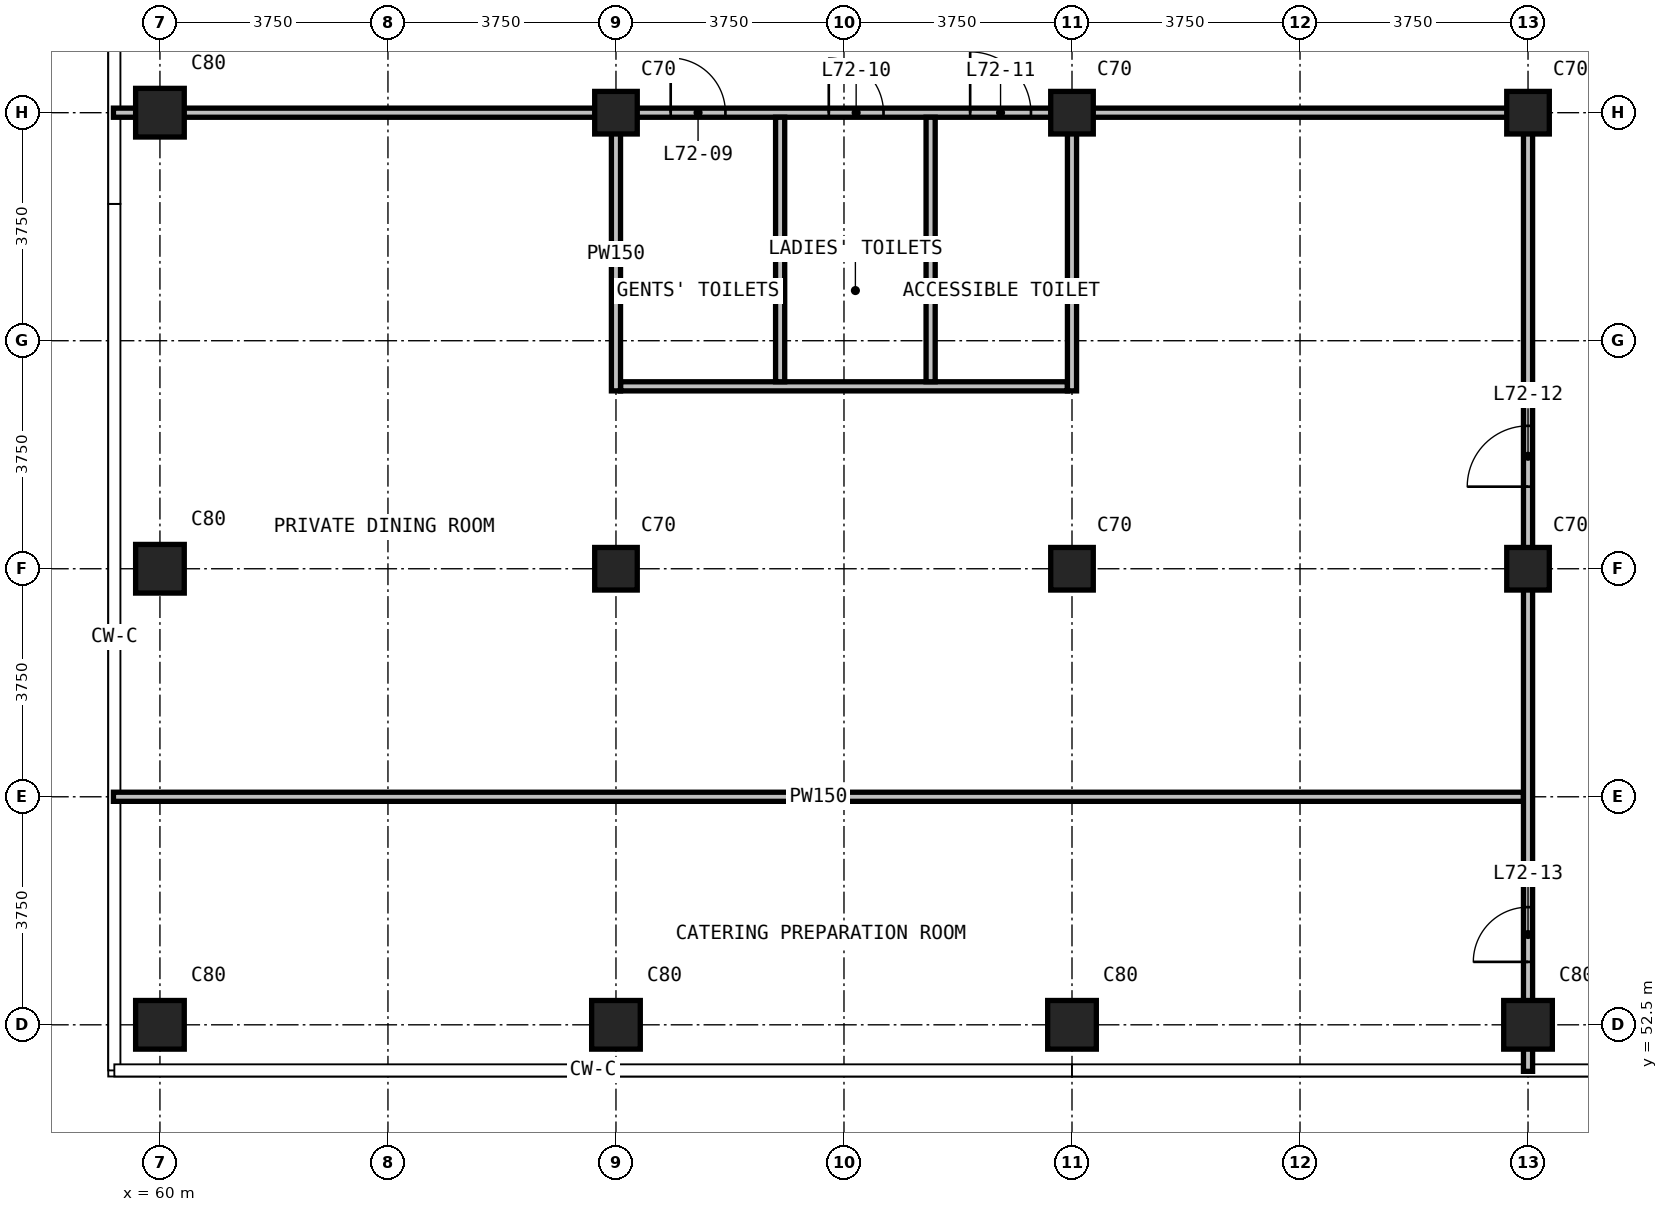
"""IFC4 building model, lengths in metres.
Left out: names, types, materials, properties, quantities, classifications, styles, units other than length and angle.
Written with IfcOpenShell. Run it as: python <this file> out.ifc"""

import sys

from ifc_helpers import new_model, si_unit, direction, frame, frame_2d, origin, origin_2d, place, context, subcontext, project, spatial, rectangle, extrude, element, fill, save


model = new_model("IFC4")
c1 = context("Model", 3, precision=1e-05, world=origin(), true_north=direction((0.0, 1.0)))
c2 = subcontext(c1, "Body", "Model", "MODEL_VIEW")
j1 = project(units=[si_unit("LENGTHUNIT", "METRE"), si_unit("PLANEANGLEUNIT", "RADIAN")], contexts=[c1])
p1 = place(None, origin())
s1 = spatial("IfcSite", under=j1, at=p1, CompositionType="ELEMENT")
p2 = place(p1, origin())
s2 = spatial("IfcBuilding", under=s1, at=p2, CompositionType="ELEMENT")
p3 = place(p2, frame((0.0, 0.0, 276.5)))
s3 = spatial("IfcBuildingStorey", under=s2, at=p3, CompositionType="ELEMENT", Elevation=276.5)
for number, where, z_axis, x_axis in (
    (1, (60.0, 52.5, 0.0), (0.0, 0.0, 1.0), (1.0, 0.0, 0.0)),
    (2, (60.0, 60.0, 0.0), (0.0, 0.0, 1.0), (1.0, 0.0, 0.0)),
    (3, (60.0, 67.5, 0.0), (0.0, 0.0, 1.0), (1.0, 0.0, 0.0)),
    (4, (67.5, 52.5, 0.0), (0.0, 0.0, 1.0), (1.0, 0.0, 0.0)),
):
    element("IfcColumn", number, at=place(p3, frame(where, z_axis=z_axis, x_axis=x_axis)), inside=s3, PredefinedType="COLUMN", context=c2, shape_type="SweptSolid", body=[
        extrude(rectangle(XDim=0.8, YDim=0.8, at=origin_2d()), origin(), (0.0, 0.0, 1.0), 3.6),
    ])
for number, where, z_axis, x_axis in (
    (5, (67.5, 60.0, 0.0), (0.0, 0.0, 1.0), (1.0, 0.0, 0.0)),
    (6, (67.5, 67.5, 0.0), (0.0, 0.0, 1.0), (1.0, 0.0, 0.0)),
):
    element("IfcColumn", number, at=place(p3, frame(where, z_axis=z_axis, x_axis=x_axis)), inside=s3, PredefinedType="COLUMN", context=c2, shape_type="SweptSolid", body=[
        extrude(rectangle(XDim=0.7, YDim=0.7, at=origin_2d()), origin(), (0.0, 0.0, 1.0), 3.6),
    ])
p4 = place(p3, frame((75.0, 52.5, 0.0), z_axis=(0.0, 0.0, 1.0), x_axis=(1.0, 0.0, 0.0)))
e7 = element("IfcColumn", 7, at=p4, inside=s3, PredefinedType="COLUMN", context=c2, shape_type="SweptSolid", body=[
    extrude(rectangle(XDim=0.8, YDim=0.8, at=origin_2d()), origin(), (0.0, 0.0, 1.0), 3.6),
])
for number, where, z_axis, x_axis in (
    (8, (75.0, 60.0, 0.0), (0.0, 0.0, 1.0), (1.0, 0.0, 0.0)),
    (9, (75.0, 67.5, 0.0), (0.0, 0.0, 1.0), (1.0, 0.0, 0.0)),
):
    element("IfcColumn", number, at=place(p3, frame(where, z_axis=z_axis, x_axis=x_axis)), inside=s3, PredefinedType="COLUMN", context=c2, shape_type="SweptSolid", body=[
        extrude(rectangle(XDim=0.7, YDim=0.7, at=origin_2d()), origin(), (0.0, 0.0, 1.0), 3.6),
    ])
p5 = place(p3, frame((82.5, 52.5, 0.0), z_axis=(0.0, 0.0, 1.0), x_axis=(1.0, 0.0, 0.0)))
e10 = element("IfcColumn", 10, at=p5, inside=s3, PredefinedType="COLUMN", context=c2, shape_type="SweptSolid", body=[
    extrude(rectangle(XDim=0.8, YDim=0.8, at=origin_2d()), origin(), (0.0, 0.0, 1.0), 3.6),
])
for number, where, z_axis, x_axis in (
    (11, (82.5, 60.0, 0.0), (0.0, 0.0, 1.0), (1.0, 0.0, 0.0)),
    (12, (82.5, 67.5, 0.0), (0.0, 0.0, 1.0), (1.0, 0.0, 0.0)),
):
    element("IfcColumn", number, at=place(p3, frame(where, z_axis=z_axis, x_axis=x_axis)), inside=s3, PredefinedType="COLUMN", context=c2, shape_type="SweptSolid", body=[
        extrude(rectangle(XDim=0.7, YDim=0.7, at=origin_2d()), origin(), (0.0, 0.0, 1.0), 3.6),
    ])
p6 = place(p3, frame((59.235, 56.25, 0.0), z_axis=(0.0, 0.0, 1.0), x_axis=(1.0, 0.0, 0.0)))
e13 = element("IfcWall", 13, at=p6, inside=s3, PredefinedType="PARTITIONING", context=c2, shape_type="SweptSolid", body=[
    extrude(rectangle(XDim=23.19, YDim=0.15, at=frame_2d((11.595, 0.0))), origin(), (0.0, 0.0, 1.0), 3.3),
])
p7 = place(p3, frame((67.575, 63.0, 0.0), z_axis=(0.0, 0.0, 1.0), x_axis=(1.0, 0.0, 0.0)))
e14 = element("IfcWall", 14, at=p7, inside=s3, PredefinedType="PARTITIONING", context=c2, shape_type="SweptSolid", body=[
    extrude(rectangle(XDim=7.35, YDim=0.15, at=frame_2d((3.675, 0.0))), origin(), (0.0, 0.0, 1.0), 3.3),
])
p8 = place(p3, frame((59.235, 67.5, 0.0), z_axis=(0.0, 0.0, 1.0), x_axis=(1.0, 0.0, 0.0)))
e15 = element("IfcWall", 15, at=p8, inside=s3, PredefinedType="PARTITIONING", context=c2, shape_type="SweptSolid", body=[
    extrude(rectangle(XDim=23.19, YDim=0.15, at=frame_2d((11.595, 0.0))), origin(), (0.0, 0.0, 1.0), 3.3),
])
p9 = place(p8, frame((9.165, 0.0, 0.0)))
e16 = element("IfcOpeningElement", 16, at=p9, cuts=e15, PredefinedType="OPENING", context=c2, shape_type="SweptSolid", body=[
    extrude(rectangle(XDim=0.9, YDim=2.2, at=frame_2d((0.45, 1.1))), frame((0.0, 0.085, 0.0), z_axis=(0.0, -1.0, 0.0), x_axis=(1.0, 0.0, 0.0)), (0.0, 0.0, 1.0), 0.17),
])
p10 = place(p8, frame((11.765, 0.0, 0.0)))
e17 = element("IfcOpeningElement", 17, at=p10, cuts=e15, PredefinedType="OPENING", context=c2, shape_type="SweptSolid", body=[
    extrude(rectangle(XDim=0.9, YDim=2.2, at=frame_2d((0.45, 1.1))), frame((0.0, 0.085, 0.0), z_axis=(0.0, -1.0, 0.0), x_axis=(1.0, 0.0, 0.0)), (0.0, 0.0, 1.0), 0.17),
])
p11 = place(p8, frame((14.09, 0.0, 0.0)))
e18 = element("IfcOpeningElement", 18, at=p11, cuts=e15, PredefinedType="OPENING", context=c2, shape_type="SweptSolid", body=[
    extrude(rectangle(XDim=1.0, YDim=2.2, at=frame_2d((0.5, 1.1))), frame((0.0, 0.085, 0.0), z_axis=(0.0, -1.0, 0.0), x_axis=(1.0, 0.0, 0.0)), (0.0, 0.0, 1.0), 0.17),
])
p12 = place(p3, frame((67.5, 62.925, 0.0), z_axis=(0.0, 0.0, 1.0), x_axis=(0.0, 1.0, 0.0)))
e19 = element("IfcWall", 19, at=p12, inside=s3, PredefinedType="PARTITIONING", context=c2, shape_type="SweptSolid", body=[
    extrude(rectangle(XDim=4.5, YDim=0.15, at=frame_2d((2.25, 0.0))), origin(), (0.0, 0.0, 1.0), 3.3),
])
for number, where, z_axis, x_axis in (
    (20, (70.2, 63.075, 0.0), (0.0, 0.0, 1.0), (0.0, 1.0, 0.0)),
    (21, (72.675, 63.075, 0.0), (0.0, 0.0, 1.0), (0.0, 1.0, 0.0)),
):
    element("IfcWall", number, at=place(p3, frame(where, z_axis=z_axis, x_axis=x_axis)), inside=s3, PredefinedType="PARTITIONING", context=c2, shape_type="SweptSolid", body=[
        extrude(rectangle(XDim=4.35, YDim=0.15, at=frame_2d((2.175, 0.0))), origin(), (0.0, 0.0, 1.0), 3.3),
    ])
p13 = place(p3, frame((75.0, 62.925, 0.0), z_axis=(0.0, 0.0, 1.0), x_axis=(0.0, 1.0, 0.0)))
e22 = element("IfcWall", 22, at=p13, inside=s3, PredefinedType="PARTITIONING", context=c2, shape_type="SweptSolid", body=[
    extrude(rectangle(XDim=4.5, YDim=0.15, at=frame_2d((2.25, 0.0))), origin(), (0.0, 0.0, 1.0), 3.3),
])
p14 = place(p3, frame((82.5, 51.735, 0.0), z_axis=(0.0, 0.0, 1.0), x_axis=(0.0, 1.0, 0.0)))
e23 = element("IfcWall", 23, at=p14, inside=s3, PredefinedType="PARTITIONING", context=c2, shape_type="SweptSolid", body=[
    extrude(rectangle(XDim=15.84, YDim=0.15, at=frame_2d((7.92, 0.0))), origin(), (0.0, 0.0, 1.0), 3.3),
])
p15 = place(p14, frame((9.615, 0.0, 0.0)))
e24 = element("IfcOpeningElement", 24, at=p15, cuts=e23, PredefinedType="OPENING", context=c2, shape_type="SweptSolid", body=[
    extrude(rectangle(XDim=1.0, YDim=2.2, at=frame_2d((0.5, 1.1))), frame((0.0, 0.085, 0.0), z_axis=(0.0, -1.0, 0.0), x_axis=(1.0, 0.0, 0.0)), (0.0, 0.0, 1.0), 0.17),
])
p16 = place(p14, frame((1.8, 0.0, 0.0)))
e25 = element("IfcOpeningElement", 25, at=p16, cuts=e23, PredefinedType="OPENING", context=c2, shape_type="SweptSolid", body=[
    extrude(rectangle(XDim=0.9, YDim=2.2, at=frame_2d((0.45, 1.1))), frame((0.0, 0.085, 0.0), z_axis=(0.0, -1.0, 0.0), x_axis=(1.0, 0.0, 0.0)), (0.0, 0.0, 1.0), 0.17),
])
p17 = place(p9, origin())
e26 = element("IfcDoor", 26, at=p17, inside=s3, OperationType="SINGLE_SWING_LEFT", PredefinedType="DOOR", context=c2, shape_type="SweptSolid", body=[
    extrude(rectangle(XDim=0.9, YDim=2.2, at=frame_2d((0.45, 1.1))), frame((0.0, 0.025, 0.0), z_axis=(0.0, -1.0, 0.0), x_axis=(1.0, 0.0, 0.0)), (0.0, 0.0, 1.0), 0.05),
])
fill(e16, e26)
p18 = place(p10, origin())
e27 = element("IfcDoor", 27, at=p18, inside=s3, OperationType="SINGLE_SWING_LEFT", PredefinedType="DOOR", context=c2, shape_type="SweptSolid", body=[
    extrude(rectangle(XDim=0.9, YDim=2.2, at=frame_2d((0.45, 1.1))), frame((0.0, 0.025, 0.0), z_axis=(0.0, -1.0, 0.0), x_axis=(1.0, 0.0, 0.0)), (0.0, 0.0, 1.0), 0.05),
])
fill(e17, e27)
p19 = place(p11, origin())
e28 = element("IfcDoor", 28, at=p19, inside=s3, OperationType="SINGLE_SWING_LEFT", PredefinedType="DOOR", context=c2, shape_type="SweptSolid", body=[
    extrude(rectangle(XDim=1.0, YDim=2.2, at=frame_2d((0.5, 1.1))), frame((0.0, 0.025, 0.0), z_axis=(0.0, -1.0, 0.0), x_axis=(1.0, 0.0, 0.0)), (0.0, 0.0, 1.0), 0.05),
])
fill(e18, e28)
p20 = place(p15, origin())
e29 = element("IfcDoor", 29, at=p20, inside=s3, OperationType="SINGLE_SWING_RIGHT", PredefinedType="DOOR", context=c2, shape_type="SweptSolid", body=[
    extrude(rectangle(XDim=1.0, YDim=2.2, at=frame_2d((0.5, 1.1))), frame((0.0, 0.025, 0.0), z_axis=(0.0, -1.0, 0.0), x_axis=(1.0, 0.0, 0.0)), (0.0, 0.0, 1.0), 0.05),
])
fill(e24, e29)
p21 = place(p16, origin())
e30 = element("IfcDoor", 30, at=p21, inside=s3, OperationType="SINGLE_SWING_LEFT", PredefinedType="DOOR", context=c2, shape_type="SweptSolid", body=[
    extrude(rectangle(XDim=0.9, YDim=2.2, at=frame_2d((0.45, 1.1))), frame((0.0, 0.025, 0.0), z_axis=(0.0, -1.0, 0.0), x_axis=(1.0, 0.0, 0.0)), (0.0, 0.0, 1.0), 0.05),
])
fill(e25, e30)
save(model, sys.argv[1])
